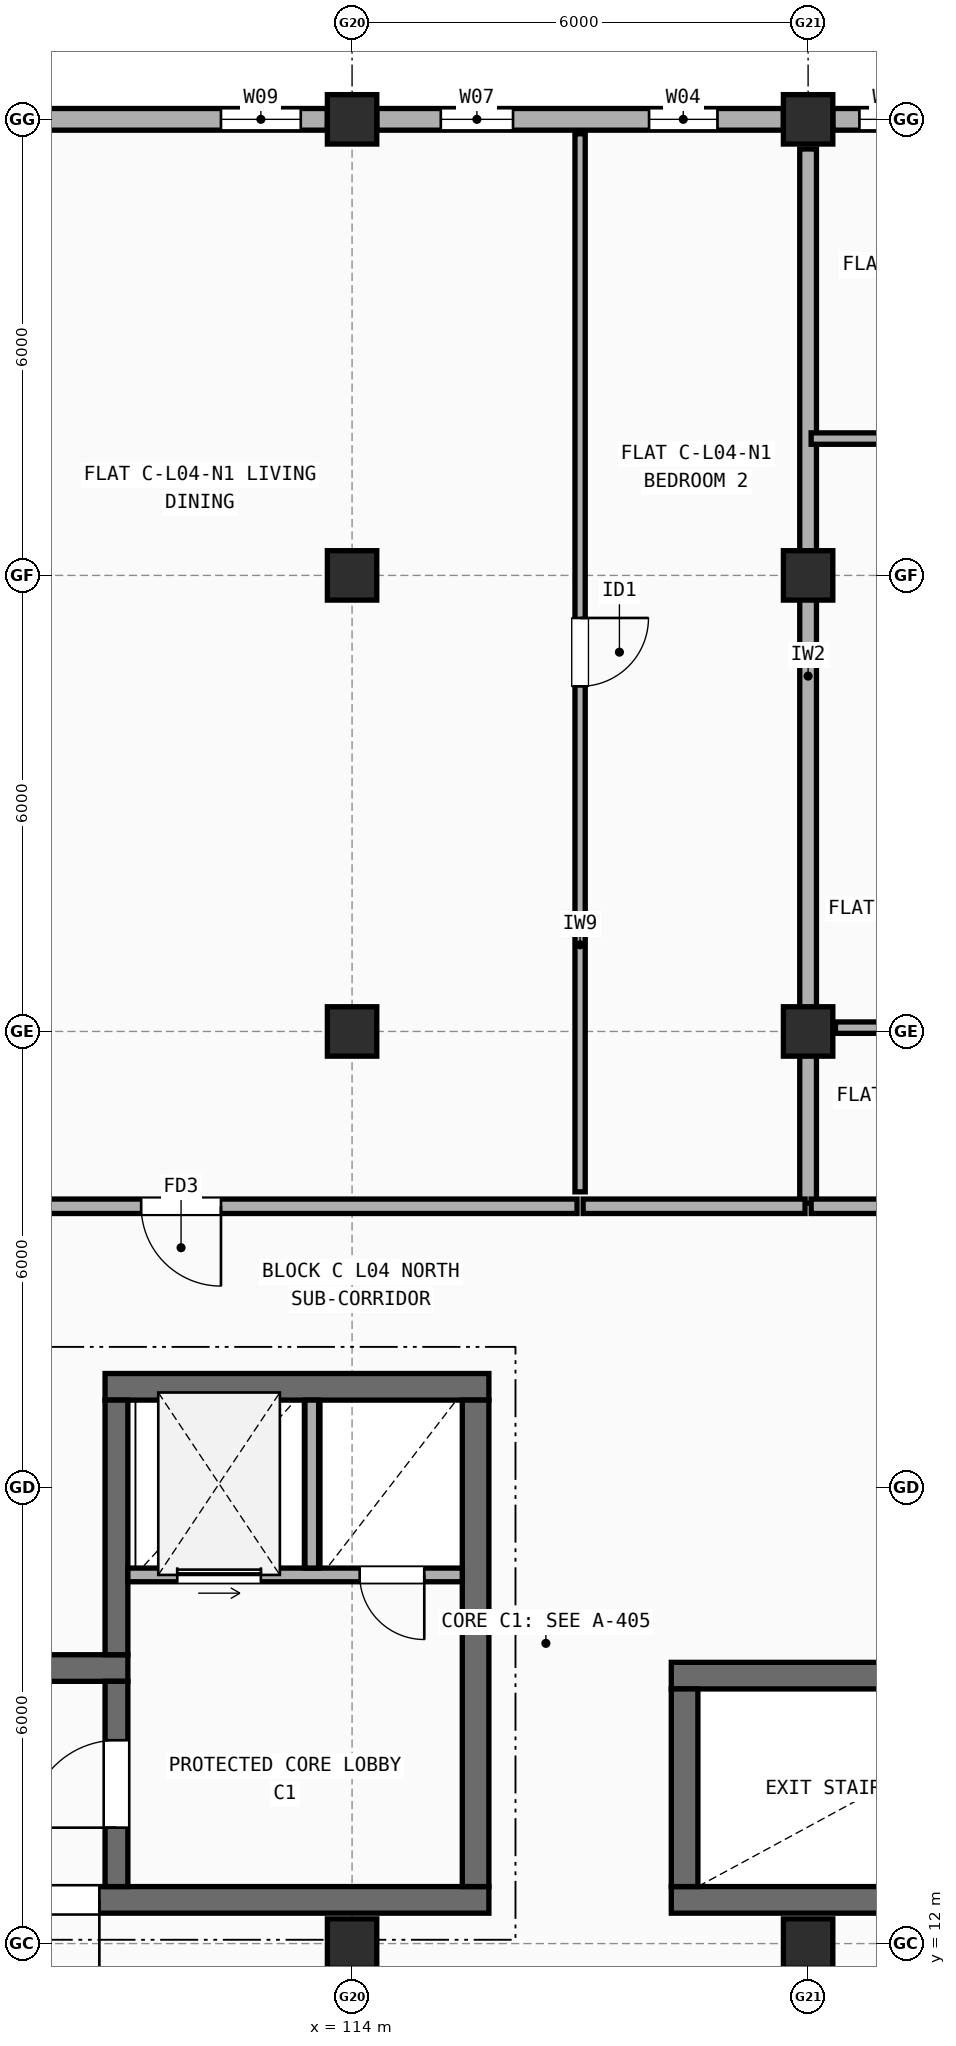
"""IFC4 building model, lengths in metres.
Left out: names, types, materials, properties, quantities, classifications, styles, units other than length and angle.
Written with IfcOpenShell. Run it as: python <this file> out.ifc"""

import sys

from ifc_helpers import new_model, si_unit, direction, frame, frame_2d, origin, origin_2d, place, context, subcontext, project, spatial, rectangle, extrude, element, fill, save


model = new_model("IFC4")
c1 = context("Model", 3, precision=1e-05, world=origin(), true_north=direction((0.0, 1.0)))
c2 = subcontext(c1, "Body", "Model", "MODEL_VIEW")
j1 = project(units=[si_unit("LENGTHUNIT", "METRE"), si_unit("PLANEANGLEUNIT", "RADIAN")], contexts=[c1])
p1 = place(None, origin())
s1 = spatial("IfcSite", under=j1, at=p1, CompositionType="ELEMENT")
p2 = place(p1, origin())
s2 = spatial("IfcBuilding", under=s1, at=p2, CompositionType="ELEMENT")
p3 = place(p2, frame((0.0, 0.0, 14.1)))
s3 = spatial("IfcBuildingStorey", under=s2, at=p3, CompositionType="ELEMENT", Elevation=14.1)
for number, where, z_axis, x_axis in (
    (1, (114.0, 12.0, 0.0), (0.0, 0.0, 1.0), (1.0, 0.0, 0.0)),
    (2, (114.0, 24.0, 0.0), (0.0, 0.0, 1.0), (1.0, 0.0, 0.0)),
    (3, (114.0, 30.0, 0.0), (0.0, 0.0, 1.0), (1.0, 0.0, 0.0)),
    (4, (114.0, 36.0, 0.0), (0.0, 0.0, 1.0), (1.0, 0.0, 0.0)),
    (5, (120.0, 12.0, 0.0), (0.0, 0.0, 1.0), (1.0, 0.0, 0.0)),
    (6, (120.0, 24.0, 0.0), (0.0, 0.0, 1.0), (1.0, 0.0, 0.0)),
    (7, (120.0, 30.0, 0.0), (0.0, 0.0, 1.0), (1.0, 0.0, 0.0)),
    (8, (120.0, 36.0, 0.0), (0.0, 0.0, 1.0), (1.0, 0.0, 0.0)),
):
    element("IfcColumn", number, at=place(p3, frame(where, z_axis=z_axis, x_axis=x_axis)), inside=s3, PredefinedType="COLUMN", context=c2, shape_type="SweptSolid", body=[
        extrude(rectangle(XDim=0.65, YDim=0.65, at=origin_2d()), origin(), (0.0, 0.0, 1.0), 2.95),
    ])
p4 = place(p3, frame((125.675, 36.0, 0.0), z_axis=(0.0, 0.0, 1.0), x_axis=(-1.0, 0.0, 0.0)))
e9 = element("IfcWall", 9, at=p4, inside=s3, PredefinedType="STANDARD", context=c2, shape_type="SweptSolid", body=[
    extrude(rectangle(XDim=5.35, YDim=0.285, at=frame_2d((2.675, 0.0))), origin(), (0.0, 0.0, 1.0), 2.432),
])
p5 = place(p4, frame((1.565, 0.0, 0.9)))
e10 = element("IfcOpeningElement", 10, at=p5, cuts=e9, PredefinedType="OPENING", context=c2, shape_type="SweptSolid", body=[
    extrude(rectangle(XDim=0.8, YDim=1.2, at=frame_2d((0.4, 0.6))), frame((0.0, 0.152, 0.0), z_axis=(0.0, -1.0, 0.0), x_axis=(1.0, 0.0, 0.0)), (0.0, 0.0, 1.0), 0.305),
])
p6 = place(p4, frame((4.2, 0.0, 0.9)))
e11 = element("IfcOpeningElement", 11, at=p6, cuts=e9, PredefinedType="OPENING", context=c2, shape_type="SweptSolid", body=[
    extrude(rectangle(XDim=0.8, YDim=1.2, at=frame_2d((0.4, 0.6))), frame((0.0, 0.152, 0.0), z_axis=(0.0, -1.0, 0.0), x_axis=(1.0, 0.0, 0.0)), (0.0, 0.0, 1.0), 0.305),
])
p7 = place(p3, frame((119.675, 36.0, 0.0), z_axis=(0.0, 0.0, 1.0), x_axis=(-1.0, 0.0, 0.0)))
e12 = element("IfcWall", 12, at=p7, inside=s3, PredefinedType="STANDARD", context=c2, shape_type="SweptSolid", body=[
    extrude(rectangle(XDim=5.35, YDim=0.285, at=frame_2d((2.675, 0.0))), origin(), (0.0, 0.0, 1.0), 2.432),
])
p8 = place(p7, frame((0.867, 0.0, 0.9)))
e13 = element("IfcOpeningElement", 13, at=p8, cuts=e12, PredefinedType="OPENING", context=c2, shape_type="SweptSolid", body=[
    extrude(rectangle(XDim=0.9, YDim=1.3, at=frame_2d((0.45, 0.65))), frame((0.0, 0.152, 0.0), z_axis=(0.0, -1.0, 0.0), x_axis=(1.0, 0.0, 0.0)), (0.0, 0.0, 1.0), 0.305),
])
p9 = place(p7, frame((3.558, 0.0, 0.9)))
e14 = element("IfcOpeningElement", 14, at=p9, cuts=e12, PredefinedType="OPENING", context=c2, shape_type="SweptSolid", body=[
    extrude(rectangle(XDim=0.95, YDim=1.35, at=frame_2d((0.475, 0.675))), frame((0.0, 0.152, 0.0), z_axis=(0.0, -1.0, 0.0), x_axis=(1.0, 0.0, 0.0)), (0.0, 0.0, 1.0), 0.305),
])
p10 = place(p3, frame((113.675, 36.0, 0.0), z_axis=(0.0, 0.0, 1.0), x_axis=(-1.0, 0.0, 0.0)))
e15 = element("IfcWall", 15, at=p10, inside=s3, PredefinedType="STANDARD", context=c2, shape_type="SweptSolid", body=[
    extrude(rectangle(XDim=5.35, YDim=0.285, at=frame_2d((2.675, 0.0))), origin(), (0.0, 0.0, 1.0), 2.432),
])
p11 = place(p10, frame((0.35, 0.0, 0.9)))
e16 = element("IfcOpeningElement", 16, at=p11, cuts=e15, PredefinedType="OPENING", context=c2, shape_type="SweptSolid", body=[
    extrude(rectangle(XDim=1.05, YDim=1.35, at=frame_2d((0.525, 0.675))), frame((0.0, 0.152, 0.0), z_axis=(0.0, -1.0, 0.0), x_axis=(1.0, 0.0, 0.0)), (0.0, 0.0, 1.0), 0.305),
])
p12 = place(p10, frame((3.95, 0.0, 0.9)))
e17 = element("IfcOpeningElement", 17, at=p12, cuts=e15, PredefinedType="OPENING", context=c2, shape_type="SweptSolid", body=[
    extrude(rectangle(XDim=1.05, YDim=1.35, at=frame_2d((0.525, 0.675))), frame((0.0, 0.152, 0.0), z_axis=(0.0, -1.0, 0.0), x_axis=(1.0, 0.0, 0.0)), (0.0, 0.0, 1.0), 0.305),
])
p13 = place(p3, frame((104.4, 12.575, 0.0), z_axis=(0.0, 0.0, 1.0), x_axis=(1.0, 0.0, 0.0)))
e18 = element("IfcWall", 18, at=p13, inside=s3, PredefinedType="SHEAR", context=c2, shape_type="SweptSolid", body=[
    extrude(rectangle(XDim=11.4, YDim=0.35, at=frame_2d((5.7, 0.0))), origin(), (0.0, 0.0, 1.0), 2.95),
])
p14 = place(p13, frame((5.125, 0.0, 0.0)))
e19 = element("IfcOpeningElement", 19, at=p14, cuts=e18, PredefinedType="OPENING", context=c2, shape_type="SweptSolid", body=[
    extrude(rectangle(XDim=1.15, YDim=2.15, at=frame_2d((0.575, 1.075))), frame((0.0, 0.185, 0.0), z_axis=(0.0, -1.0, 0.0), x_axis=(1.0, 0.0, 0.0)), (0.0, 0.0, 1.0), 0.37),
])
p15 = place(p3, frame((111.05, 15.625, 0.0), z_axis=(0.0, 0.0, 1.0), x_axis=(-1.0, 0.0, 0.0)))
e20 = element("IfcWall", 20, at=p15, inside=s3, PredefinedType="SHEAR", context=c2, shape_type="SweptSolid", body=[
    extrude(rectangle(XDim=6.65, YDim=0.35, at=frame_2d((3.325, 0.0))), origin(), (0.0, 0.0, 1.0), 2.95),
])
p16 = place(p3, frame((110.9, 12.75, 0.0), z_axis=(0.0, 0.0, 1.0), x_axis=(0.0, 1.0, 0.0)))
e21 = element("IfcWall", 21, at=p16, inside=s3, PredefinedType="SHEAR", context=c2, shape_type="SweptSolid", body=[
    extrude(rectangle(XDim=2.7, YDim=0.3, at=frame_2d((1.35, 0.0))), origin(), (0.0, 0.0, 1.0), 2.95),
])
p17 = place(p16, frame((0.775, 0.0, 0.0)))
e22 = element("IfcOpeningElement", 22, at=p17, cuts=e21, PredefinedType="OPENING", context=c2, shape_type="SweptSolid", body=[
    extrude(rectangle(XDim=1.15, YDim=2.15, at=frame_2d((0.575, 1.075))), frame((0.0, 0.16, 0.0), z_axis=(0.0, -1.0, 0.0), x_axis=(1.0, 0.0, 0.0)), (0.0, 0.0, 1.0), 0.32),
])
p18 = place(p3, frame((115.8, 19.325, 0.0), z_axis=(0.0, 0.0, 1.0), x_axis=(-1.0, 0.0, 0.0)))
e23 = element("IfcWall", 23, at=p18, inside=s3, PredefinedType="SHEAR", context=c2, shape_type="SweptSolid", body=[
    extrude(rectangle(XDim=5.05, YDim=0.35, at=frame_2d((2.525, 0.0))), origin(), (0.0, 0.0, 1.0), 2.95),
])
p19 = place(p3, frame((115.625, 12.75, 0.0), z_axis=(0.0, 0.0, 1.0), x_axis=(0.0, 1.0, 0.0)))
e24 = element("IfcWall", 24, at=p19, inside=s3, PredefinedType="SHEAR", context=c2, shape_type="SweptSolid", body=[
    extrude(rectangle(XDim=6.4, YDim=0.35, at=frame_2d((3.2, 0.0))), origin(), (0.0, 0.0, 1.0), 2.95),
])
p20 = place(p3, frame((110.9, 15.8, 0.0), z_axis=(0.0, 0.0, 1.0), x_axis=(0.0, 1.0, 0.0)))
e25 = element("IfcWall", 25, at=p20, inside=s3, PredefinedType="SHEAR", context=c2, shape_type="SweptSolid", body=[
    extrude(rectangle(XDim=3.35, YDim=0.3, at=frame_2d((1.675, 0.0))), origin(), (0.0, 0.0, 1.0), 2.95),
])
p21 = place(p3, frame((111.05, 16.85, 0.0), z_axis=(0.0, 0.0, 1.0), x_axis=(1.0, 0.0, 0.0)))
e26 = element("IfcWall", 26, at=p21, inside=s3, PredefinedType="SOLIDWALL", context=c2, shape_type="SweptSolid", body=[
    extrude(rectangle(XDim=4.4, YDim=0.18, at=frame_2d((2.2, 0.0))), origin(), (0.0, 0.0, 1.0), 2.95),
])
p22 = place(p21, frame((0.65, 0.0, 0.0)))
e27 = element("IfcOpeningElement", 27, at=p22, cuts=e26, PredefinedType="OPENING", context=c2, shape_type="SweptSolid", body=[
    extrude(rectangle(XDim=1.1, YDim=2.15, at=frame_2d((0.55, 1.075))), frame((0.0, 0.1, 0.0), z_axis=(0.0, -1.0, 0.0), x_axis=(1.0, 0.0, 0.0)), (0.0, 0.0, 1.0), 0.2),
])
p23 = place(p21, frame((3.05, 0.0, 0.0)))
e28 = element("IfcOpeningElement", 28, at=p23, cuts=e26, PredefinedType="OPENING", context=c2, shape_type="SweptSolid", body=[
    extrude(rectangle(XDim=0.85, YDim=2.1, at=frame_2d((0.425, 1.05))), frame((0.0, 0.1, 0.0), z_axis=(0.0, -1.0, 0.0), x_axis=(1.0, 0.0, 0.0)), (0.0, 0.0, 1.0), 0.2),
])
p24 = place(p3, frame((113.47, 16.94, 0.0), z_axis=(0.0, 0.0, 1.0), x_axis=(0.0, 1.0, 0.0)))
e29 = element("IfcWall", 29, at=p24, inside=s3, PredefinedType="SOLIDWALL", context=c2, shape_type="SweptSolid", body=[
    extrude(rectangle(XDim=2.21, YDim=0.18, at=frame_2d((1.105, 0.0))), origin(), (0.0, 0.0, 1.0), 2.95),
])
p25 = place(p3, frame((118.2, 12.575, 0.0), z_axis=(0.0, 0.0, 1.0), x_axis=(1.0, 0.0, 0.0)))
e30 = element("IfcWall", 30, at=p25, inside=s3, PredefinedType="SHEAR", context=c2, shape_type="SweptSolid", body=[
    extrude(rectangle(XDim=11.4, YDim=0.35, at=frame_2d((5.7, 0.0))), origin(), (0.0, 0.0, 1.0), 2.95),
])
p26 = place(p25, frame((5.1, 0.0, 0.0)))
e31 = element("IfcOpeningElement", 31, at=p26, cuts=e30, PredefinedType="OPENING", context=c2, shape_type="SweptSolid", body=[
    extrude(rectangle(XDim=1.2, YDim=2.15, at=frame_2d((0.6, 1.075))), frame((0.0, 0.185, 0.0), z_axis=(0.0, -1.0, 0.0), x_axis=(1.0, 0.0, 0.0)), (0.0, 0.0, 1.0), 0.37),
])
p27 = place(p3, frame((124.85, 15.525, 0.0), z_axis=(0.0, 0.0, 1.0), x_axis=(-1.0, 0.0, 0.0)))
e32 = element("IfcWall", 32, at=p27, inside=s3, PredefinedType="SHEAR", context=c2, shape_type="SweptSolid", body=[
    extrude(rectangle(XDim=6.65, YDim=0.35, at=frame_2d((3.325, 0.0))), origin(), (0.0, 0.0, 1.0), 2.95),
])
p28 = place(p3, frame((118.375, 15.35, 0.0), z_axis=(0.0, 0.0, 1.0), x_axis=(0.0, -1.0, 0.0)))
e33 = element("IfcWall", 33, at=p28, inside=s3, PredefinedType="SHEAR", context=c2, shape_type="SweptSolid", body=[
    extrude(rectangle(XDim=2.6, YDim=0.35, at=frame_2d((1.3, 0.0))), origin(), (0.0, 0.0, 1.0), 2.95),
])
p29 = place(p3, frame((120.0, 21.74, 0.0), z_axis=(0.0, 0.0, 1.0), x_axis=(0.0, 1.0, 0.0)))
e34 = element("IfcWall", 34, at=p29, inside=s3, PredefinedType="SOLIDWALL", context=c2, shape_type="SweptSolid", body=[
    extrude(rectangle(XDim=13.87, YDim=0.22, at=frame_2d((6.935, 0.0))), origin(), (0.0, 0.0, 1.0), 2.508),
])
p30 = place(p3, frame((106.54, 21.7, 0.0), z_axis=(0.0, 0.0, 1.0), x_axis=(1.0, 0.0, 0.0)))
e35 = element("IfcWall", 35, at=p30, inside=s3, PredefinedType="SOLIDWALL", context=c2, shape_type="SweptSolid", body=[
    extrude(rectangle(XDim=10.42, YDim=0.19, at=frame_2d((5.21, 0.0))), origin(), (0.0, 0.0, 1.0), 2.508),
])
p31 = place(p30, frame((4.685, 0.0, 0.0)))
e36 = element("IfcOpeningElement", 36, at=p31, cuts=e35, PredefinedType="OPENING", context=c2, shape_type="SweptSolid", body=[
    extrude(rectangle(XDim=1.05, YDim=2.15, at=frame_2d((0.525, 1.075))), frame((0.0, 0.105, 0.0), z_axis=(0.0, -1.0, 0.0), x_axis=(1.0, 0.0, 0.0)), (0.0, 0.0, 1.0), 0.21),
])
p32 = place(p3, frame((117.04, 21.7, 0.0), z_axis=(0.0, 0.0, 1.0), x_axis=(1.0, 0.0, 0.0)))
e37 = element("IfcWall", 37, at=p32, inside=s3, PredefinedType="SOLIDWALL", context=c2, shape_type="SweptSolid", body=[
    extrude(rectangle(XDim=2.92, YDim=0.19, at=frame_2d((1.46, 0.0))), origin(), (0.0, 0.0, 1.0), 2.95),
])
p33 = place(p3, frame((117.0, 21.89, 0.0), z_axis=(0.0, 0.0, 1.0), x_axis=(0.0, 1.0, 0.0)))
e38 = element("IfcWall", 38, at=p33, inside=s3, PredefinedType="PARTITIONING", context=c2, shape_type="SweptSolid", body=[
    extrude(rectangle(XDim=13.92, YDim=0.135, at=frame_2d((6.96, 0.0))), origin(), (0.0, 0.0, 1.0), 2.432),
])
p34 = place(p33, frame((6.65, 0.0, 0.0)))
e39 = element("IfcOpeningElement", 39, at=p34, cuts=e38, PredefinedType="OPENING", context=c2, shape_type="SweptSolid", body=[
    extrude(rectangle(XDim=0.9, YDim=2.1, at=frame_2d((0.45, 1.05))), frame((0.0, 0.077, 0.0), z_axis=(0.0, -1.0, 0.0), x_axis=(1.0, 0.0, 0.0)), (0.0, 0.0, 1.0), 0.155),
])
p35 = place(p3, frame((120.04, 21.7, 0.0), z_axis=(0.0, 0.0, 1.0), x_axis=(1.0, 0.0, 0.0)))
e40 = element("IfcWall", 40, at=p35, inside=s3, PredefinedType="SOLIDWALL", context=c2, shape_type="SweptSolid", body=[
    extrude(rectangle(XDim=4.42, YDim=0.19, at=frame_2d((2.21, 0.0))), origin(), (0.0, 0.0, 1.0), 2.95),
])
p36 = place(p3, frame((120.04, 31.8, 0.0), z_axis=(0.0, 0.0, 1.0), x_axis=(1.0, 0.0, 0.0)))
e41 = element("IfcWall", 41, at=p36, inside=s3, PredefinedType="PARTITIONING", context=c2, shape_type="SweptSolid", body=[
    extrude(rectangle(XDim=4.42, YDim=0.15, at=frame_2d((2.21, 0.0))), origin(), (0.0, 0.0, 1.0), 2.508),
])
p37 = place(p3, frame((120.36, 24.05, 0.0), z_axis=(0.0, 0.0, 1.0), x_axis=(1.0, 0.0, 0.0)))
e42 = element("IfcWall", 42, at=p37, inside=s3, PredefinedType="PARTITIONING", context=c2, shape_type="SweptSolid", body=[
    extrude(rectangle(XDim=4.1, YDim=0.15, at=frame_2d((2.05, 0.0))), origin(), (0.0, 0.0, 1.0), 2.508),
])
p38 = place(p6, origin())
e43 = element("IfcWindow", 43, at=p38, inside=s3, PartitioningType="SINGLE_PANEL", PredefinedType="WINDOW", context=c2, shape_type="SweptSolid", body=[
    extrude(rectangle(XDim=0.8, YDim=1.2, at=frame_2d((0.4, 0.6))), frame((0.0, 0.03, 0.0), z_axis=(0.0, -1.0, 0.0), x_axis=(1.0, 0.0, 0.0)), (0.0, 0.0, 1.0), 0.06),
])
fill(e11, e43)
p39 = place(p8, origin())
e44 = element("IfcWindow", 44, at=p39, inside=s3, PartitioningType="SINGLE_PANEL", PredefinedType="WINDOW", context=c2, shape_type="SweptSolid", body=[
    extrude(rectangle(XDim=0.9, YDim=1.3, at=frame_2d((0.45, 0.65))), frame((0.0, 0.03, 0.0), z_axis=(0.0, -1.0, 0.0), x_axis=(1.0, 0.0, 0.0)), (0.0, 0.0, 1.0), 0.06),
])
fill(e13, e44)
p40 = place(p9, origin())
e45 = element("IfcWindow", 45, at=p40, inside=s3, PartitioningType="SINGLE_PANEL", PredefinedType="WINDOW", context=c2, shape_type="SweptSolid", body=[
    extrude(rectangle(XDim=0.95, YDim=1.35, at=frame_2d((0.475, 0.675))), frame((0.0, 0.03, 0.0), z_axis=(0.0, -1.0, 0.0), x_axis=(1.0, 0.0, 0.0)), (0.0, 0.0, 1.0), 0.06),
])
fill(e14, e45)
p41 = place(p11, origin())
e46 = element("IfcWindow", 46, at=p41, inside=s3, PartitioningType="SINGLE_PANEL", PredefinedType="WINDOW", context=c2, shape_type="SweptSolid", body=[
    extrude(rectangle(XDim=1.05, YDim=1.35, at=frame_2d((0.525, 0.675))), frame((0.0, 0.03, 0.0), z_axis=(0.0, -1.0, 0.0), x_axis=(1.0, 0.0, 0.0)), (0.0, 0.0, 1.0), 0.06),
])
fill(e16, e46)
p42 = place(p14, origin())
e47 = element("IfcDoor", 47, at=p42, inside=s3, OperationType="SINGLE_SWING_RIGHT", PredefinedType="DOOR", context=c2, shape_type="SweptSolid", body=[
    extrude(rectangle(XDim=1.15, YDim=2.15, at=frame_2d((0.575, 1.075))), frame((0.0, 0.025, 0.0), z_axis=(0.0, -1.0, 0.0), x_axis=(1.0, 0.0, 0.0)), (0.0, 0.0, 1.0), 0.05),
])
fill(e19, e47)
p43 = place(p17, origin())
e48 = element("IfcDoor", 48, at=p43, inside=s3, OperationType="SINGLE_SWING_LEFT", PredefinedType="DOOR", context=c2, shape_type="SweptSolid", body=[
    extrude(rectangle(XDim=1.15, YDim=2.15, at=frame_2d((0.575, 1.075))), frame((0.0, 0.025, 0.0), z_axis=(0.0, -1.0, 0.0), x_axis=(1.0, 0.0, 0.0)), (0.0, 0.0, 1.0), 0.05),
])
fill(e22, e48)
p44 = place(p22, origin())
e49 = element("IfcDoor", 49, at=p44, inside=s3, OperationType="SLIDING_TO_LEFT", PredefinedType="DOOR", context=c2, shape_type="SweptSolid", body=[
    extrude(rectangle(XDim=1.1, YDim=2.15, at=frame_2d((0.55, 1.075))), frame((0.0, 0.025, 0.0), z_axis=(0.0, -1.0, 0.0), x_axis=(1.0, 0.0, 0.0)), (0.0, 0.0, 1.0), 0.05),
])
fill(e27, e49)
p45 = place(p23, frame((0.85, 0.0, 0.0), z_axis=(0.0, 0.0, 1.0), x_axis=(-1.0, 0.0, 0.0)))
e50 = element("IfcDoor", 50, at=p45, inside=s3, OperationType="SINGLE_SWING_RIGHT", PredefinedType="DOOR", context=c2, shape_type="SweptSolid", body=[
    extrude(rectangle(XDim=0.85, YDim=2.1, at=frame_2d((0.425, 1.05))), frame((0.0, 0.025, 0.0), z_axis=(0.0, -1.0, 0.0), x_axis=(1.0, 0.0, 0.0)), (0.0, 0.0, 1.0), 0.05),
])
fill(e28, e50)
p46 = place(p31, origin())
e51 = element("IfcDoor", 51, at=p46, inside=s3, OperationType="SINGLE_SWING_RIGHT", PredefinedType="DOOR", context=c2, shape_type="SweptSolid", body=[
    extrude(rectangle(XDim=1.05, YDim=2.15, at=frame_2d((0.525, 1.075))), frame((0.0, 0.025, 0.0), z_axis=(0.0, -1.0, 0.0), x_axis=(1.0, 0.0, 0.0)), (0.0, 0.0, 1.0), 0.05),
])
fill(e36, e51)
p47 = place(p34, origin())
e52 = element("IfcDoor", 52, at=p47, inside=s3, OperationType="SINGLE_SWING_RIGHT", PredefinedType="DOOR", context=c2, shape_type="SweptSolid", body=[
    extrude(rectangle(XDim=0.9, YDim=2.1, at=frame_2d((0.45, 1.05))), frame((0.0, 0.025, 0.0), z_axis=(0.0, -1.0, 0.0), x_axis=(1.0, 0.0, 0.0)), (0.0, 0.0, 1.0), 0.05),
])
fill(e39, e52)
save(model, sys.argv[1])
